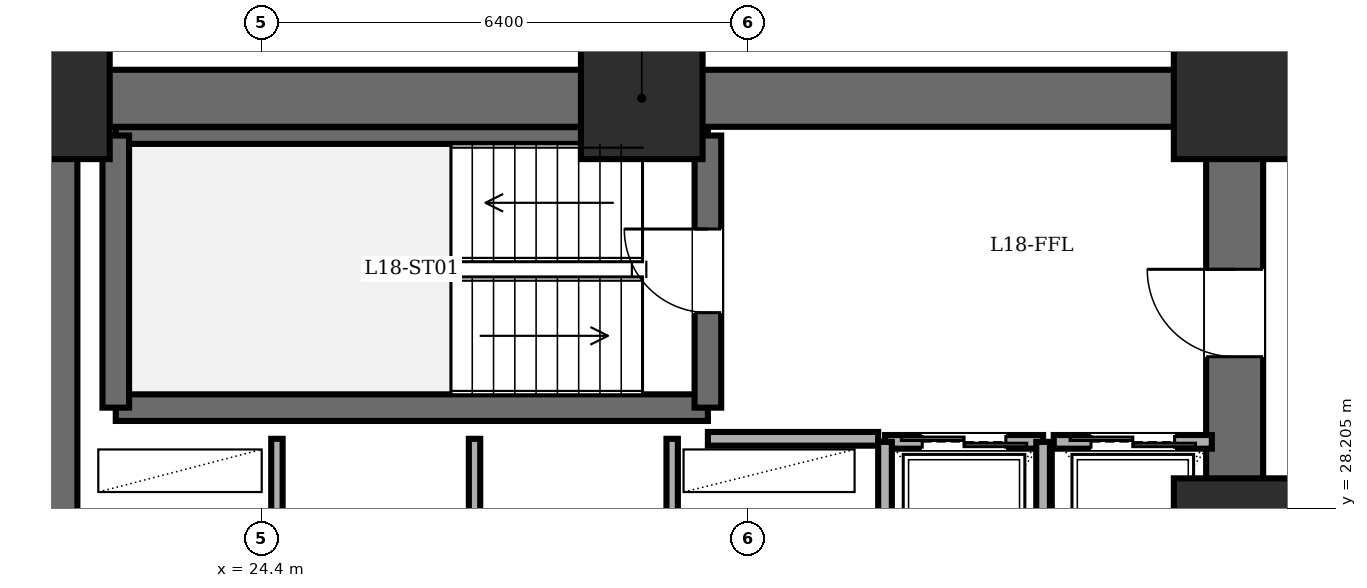
"""IFC4 building model, lengths in metres.
Left out: names, types, materials, properties, quantities, classifications, styles, units other than length and angle.
Written with IfcOpenShell. Run it as: python <this file> out.ifc"""

import sys

from ifc_helpers import new_model, si_unit, direction, frame, frame_2d, origin, origin_2d, place, context, subcontext, project, spatial, rectangle, extrude, element, fill, save


model = new_model("IFC4")
c1 = context("Model", 3, precision=1e-05, world=origin(), true_north=direction((0.0, 1.0)))
c2 = subcontext(c1, "Body", "Model", "MODEL_VIEW")
j1 = project(units=[si_unit("LENGTHUNIT", "METRE"), si_unit("PLANEANGLEUNIT", "RADIAN")], contexts=[c1])
p1 = place(None, origin())
s1 = spatial("IfcSite", under=j1, at=p1, CompositionType="ELEMENT")
p2 = place(p1, origin())
s2 = spatial("IfcBuilding", under=s1, at=p2, CompositionType="ELEMENT")
p3 = place(p2, frame((0.0, 0.0, 68.4)))
s3 = spatial("IfcBuildingStorey", under=s2, at=p3, CompositionType="ELEMENT", Elevation=68.4)
for number, where, z_axis, x_axis in (
    (1, (37.2, 27.8, 0.0), (0.0, 0.0, 1.0), (1.0, 0.0, 0.0)),
    (2, (37.2, 33.6, 0.0), (0.0, 0.0, 1.0), (1.0, 0.0, 0.0)),
    (3, (29.4, 33.6, 0.0), (0.0, 0.0, 1.0), (1.0, 0.0, 0.0)),
    (4, (21.6, 33.6, 0.0), (0.0, 0.0, 1.0), (1.0, 0.0, 0.0)),
):
    element("IfcColumn", number, at=place(p3, frame(where, z_axis=z_axis, x_axis=x_axis)), inside=s3, PredefinedType="COLUMN", context=c2, shape_type="SweptSolid", body=[
        extrude(rectangle(XDim=1.6, YDim=1.6, at=origin_2d()), origin(), (0.0, 0.0, 1.0), 3.6),
    ])
p4 = place(p3, frame((21.6, 14.4, 0.0), z_axis=(0.0, 0.0, 1.0), x_axis=(0.0, 1.0, 0.0)))
e5 = element("IfcWall", 5, at=p4, inside=s3, PredefinedType="SHEAR", context=c2, shape_type="SweptSolid", body=[
    extrude(rectangle(XDim=19.2, YDim=0.75, at=frame_2d((9.6, 0.0))), origin(), (0.0, 0.0, 1.0), 3.4),
])
p5 = place(p3, frame((21.6, 33.6, 0.0), z_axis=(0.0, 0.0, 1.0), x_axis=(1.0, 0.0, 0.0)))
e6 = element("IfcWall", 6, at=p5, inside=s3, PredefinedType="SHEAR", context=c2, shape_type="SweptSolid", body=[
    extrude(rectangle(XDim=15.6, YDim=0.75, at=frame_2d((7.8, 0.0))), origin(), (0.0, 0.0, 1.0), 3.4),
])
p6 = place(p3, frame((37.2, 14.4, 0.0), z_axis=(0.0, 0.0, 1.0), x_axis=(0.0, 1.0, 0.0)))
e7 = element("IfcWall", 7, at=p6, inside=s3, PredefinedType="SHEAR", context=c2, shape_type="SweptSolid", body=[
    extrude(rectangle(XDim=19.2, YDim=0.75, at=frame_2d((9.6, 0.0))), origin(), (0.0, 0.0, 1.0), 3.4),
])
p7 = place(p6, frame((15.8, 0.0, 0.0)))
e8 = element("IfcOpeningElement", 8, at=p7, cuts=e7, PredefinedType="OPENING", context=c2, shape_type="SweptSolid", body=[
    extrude(rectangle(XDim=1.15, YDim=2.15, at=frame_2d((0.575, 1.075))), frame((0.0, 0.385, 0.0), z_axis=(0.0, -1.0, 0.0), x_axis=(1.0, 0.0, 0.0)), (0.0, 0.0, 1.0), 0.77),
])
p8 = place(p6, frame((3.6, 0.0, 0.0)))
e9 = element("IfcOpeningElement", 9, at=p8, cuts=e7, PredefinedType="OPENING", context=c2, shape_type="SweptSolid", body=[
    extrude(rectangle(XDim=1.1, YDim=2.15, at=frame_2d((0.55, 1.075))), frame((0.0, 0.385, 0.0), z_axis=(0.0, -1.0, 0.0), x_axis=(1.0, 0.0, 0.0)), (0.0, 0.0, 1.0), 0.77),
])
p9 = place(p6, frame((8.6, 0.0, 0.0)))
e10 = element("IfcOpeningElement", 10, at=p9, cuts=e7, PredefinedType="OPENING", context=c2, shape_type="SweptSolid", body=[
    extrude(rectangle(XDim=1.3, YDim=2.2, at=frame_2d((0.65, 1.1))), frame((0.0, 0.385, 0.0), z_axis=(0.0, -1.0, 0.0), x_axis=(1.0, 0.0, 0.0)), (0.0, 0.0, 1.0), 0.77),
])
p10 = place(p3, frame((22.48, 29.53, 0.0), z_axis=(0.0, 0.0, 1.0), x_axis=(1.0, 0.0, 0.0)))
e11 = element("IfcWall", 11, at=p10, inside=s3, PredefinedType="SOLIDWALL", context=c2, shape_type="SweptSolid", body=[
    extrude(rectangle(XDim=7.79, YDim=0.35, at=frame_2d((3.895, 0.0))), origin(), (0.0, 0.0, 1.0), 3.4),
])
p11 = place(p3, frame((22.48, 33.11, 0.0), z_axis=(0.0, 0.0, 1.0), x_axis=(1.0, 0.0, 0.0)))
e12 = element("IfcWall", 12, at=p11, inside=s3, PredefinedType="PARTITIONING", context=c2, shape_type="SweptSolid", body=[
    extrude(rectangle(XDim=7.79, YDim=0.22, at=frame_2d((3.895, 0.0))), origin(), (0.0, 0.0, 1.0), 3.4),
])
p12 = place(p3, frame((22.48, 29.53, 0.0), z_axis=(0.0, 0.0, 1.0), x_axis=(0.0, 1.0, 0.0)))
e13 = element("IfcWall", 13, at=p12, inside=s3, PredefinedType="SOLIDWALL", context=c2, shape_type="SweptSolid", body=[
    extrude(rectangle(XDim=3.58, YDim=0.35, at=frame_2d((1.79, 0.0))), origin(), (0.0, 0.0, 1.0), 3.4),
])
p13 = place(p3, frame((30.27, 29.53, 0.0), z_axis=(0.0, 0.0, 1.0), x_axis=(0.0, 1.0, 0.0)))
e14 = element("IfcWall", 14, at=p13, inside=s3, PredefinedType="SOLIDWALL", context=c2, shape_type="SweptSolid", body=[
    extrude(rectangle(XDim=3.58, YDim=0.35, at=frame_2d((1.79, 0.0))), origin(), (0.0, 0.0, 1.0), 3.4),
])
p14 = place(p13, frame((1.25, 0.0, 0.0)))
e15 = element("IfcOpeningElement", 15, at=p14, cuts=e14, PredefinedType="OPENING", context=c2, shape_type="SweptSolid", body=[
    extrude(rectangle(XDim=1.1, YDim=2.15, at=frame_2d((0.55, 1.075))), frame((0.0, 0.185, 0.0), z_axis=(0.0, -1.0, 0.0), x_axis=(1.0, 0.0, 0.0)), (0.0, 0.0, 1.0), 0.37),
])
p15 = place(p3, frame((30.27, 29.12, 0.0), z_axis=(0.0, 0.0, 1.0), x_axis=(1.0, 0.0, 0.0)))
e16 = element("IfcWall", 16, at=p15, inside=s3, PredefinedType="PARTITIONING", context=c2, shape_type="SweptSolid", body=[
    extrude(rectangle(XDim=2.24, YDim=0.18, at=frame_2d((1.12, 0.0))), origin(), (0.0, 0.0, 1.0), 3.4),
])
for number, where, z_axis, x_axis in (
    (17, (24.6, 27.6, 0.0), (0.0, 0.0, 1.0), (0.0, 1.0, 0.0)),
    (18, (27.2, 27.6, 0.0), (0.0, 0.0, 1.0), (0.0, 1.0, 0.0)),
    (19, (29.8, 27.6, 0.0), (0.0, 0.0, 1.0), (0.0, 1.0, 0.0)),
):
    element("IfcWall", number, at=place(p3, frame(where, z_axis=z_axis, x_axis=x_axis)), inside=s3, PredefinedType="PARTITIONING", context=c2, shape_type="SweptSolid", body=[
        extrude(rectangle(XDim=1.52, YDim=0.15, at=frame_2d((0.76, 0.0))), origin(), (0.0, 0.0, 1.0), 3.4),
    ])
p16 = place(p3, frame((32.6, 29.08, 0.0), z_axis=(0.0, 0.0, 1.0), x_axis=(1.0, 0.0, 0.0)))
e20 = element("IfcWall", 20, at=p16, inside=s3, PredefinedType="PARTITIONING", context=c2, shape_type="SweptSolid", body=[
    extrude(rectangle(XDim=2.08, YDim=0.18, at=frame_2d((1.04, 0.0))), origin(), (0.0, 0.0, 1.0), 3.4),
])
p17 = place(p16, frame((0.49, 0.0, 0.0)))
e21 = element("IfcOpeningElement", 21, at=p17, cuts=e20, PredefinedType="OPENING", context=c2, shape_type="SweptSolid", body=[
    extrude(rectangle(XDim=1.1, YDim=2.2, at=frame_2d((0.55, 1.1))), frame((0.0, 0.1, 0.0), z_axis=(0.0, -1.0, 0.0), x_axis=(1.0, 0.0, 0.0)), (0.0, 0.0, 1.0), 0.2),
])
for number, where, z_axis, x_axis in (
    (22, (34.68, 26.35, 0.0), (0.0, 0.0, 1.0), (0.0, 1.0, 0.0)),
    (23, (32.6, 29.08, 0.0), (0.0, 0.0, 1.0), (0.0, -1.0, 0.0)),
):
    element("IfcWall", number, at=place(p3, frame(where, z_axis=z_axis, x_axis=x_axis)), inside=s3, PredefinedType="PARTITIONING", context=c2, shape_type="SweptSolid", body=[
        extrude(rectangle(XDim=2.73, YDim=0.18, at=frame_2d((1.365, 0.0))), origin(), (0.0, 0.0, 1.0), 3.4),
    ])
p18 = place(p3, frame((34.82, 29.08, 0.0), z_axis=(0.0, 0.0, 1.0), x_axis=(1.0, 0.0, 0.0)))
e24 = element("IfcWall", 24, at=p18, inside=s3, PredefinedType="PARTITIONING", context=c2, shape_type="SweptSolid", body=[
    extrude(rectangle(XDim=2.08, YDim=0.18, at=frame_2d((1.04, 0.0))), origin(), (0.0, 0.0, 1.0), 3.4),
])
p19 = place(p18, frame((0.49, 0.0, 0.0)))
e25 = element("IfcOpeningElement", 25, at=p19, cuts=e24, PredefinedType="OPENING", context=c2, shape_type="SweptSolid", body=[
    extrude(rectangle(XDim=1.1, YDim=2.2, at=frame_2d((0.55, 1.1))), frame((0.0, 0.1, 0.0), z_axis=(0.0, -1.0, 0.0), x_axis=(1.0, 0.0, 0.0)), (0.0, 0.0, 1.0), 0.2),
])
p20 = place(p14, origin())
e26 = element("IfcDoor", 26, at=p20, inside=s3, OperationType="SINGLE_SWING_RIGHT", PredefinedType="DOOR", context=c2, shape_type="SweptSolid", body=[
    extrude(rectangle(XDim=1.1, YDim=2.15, at=frame_2d((0.55, 1.075))), frame((0.0, 0.025, 0.0), z_axis=(0.0, -1.0, 0.0), x_axis=(1.0, 0.0, 0.0)), (0.0, 0.0, 1.0), 0.05),
])
fill(e15, e26)
p21 = place(p7, origin())
e27 = element("IfcDoor", 27, at=p21, inside=s3, OperationType="SINGLE_SWING_RIGHT", PredefinedType="DOOR", context=c2, shape_type="SweptSolid", body=[
    extrude(rectangle(XDim=1.15, YDim=2.15, at=frame_2d((0.575, 1.075))), frame((0.0, 0.025, 0.0), z_axis=(0.0, -1.0, 0.0), x_axis=(1.0, 0.0, 0.0)), (0.0, 0.0, 1.0), 0.05),
])
fill(e8, e27)
p22 = place(p17, origin())
e28 = element("IfcDoor", 28, at=p22, inside=s3, OperationType="DOUBLE_DOOR_SLIDING", PredefinedType="DOOR", context=c2, shape_type="SweptSolid", body=[
    extrude(rectangle(XDim=1.1, YDim=2.2, at=frame_2d((0.55, 1.1))), frame((0.0, 0.025, 0.0), z_axis=(0.0, -1.0, 0.0), x_axis=(1.0, 0.0, 0.0)), (0.0, 0.0, 1.0), 0.05),
])
fill(e21, e28)
p23 = place(p19, origin())
e29 = element("IfcDoor", 29, at=p23, inside=s3, OperationType="DOUBLE_DOOR_SLIDING", PredefinedType="DOOR", context=c2, shape_type="SweptSolid", body=[
    extrude(rectangle(XDim=1.1, YDim=2.2, at=frame_2d((0.55, 1.1))), frame((0.0, 0.025, 0.0), z_axis=(0.0, -1.0, 0.0), x_axis=(1.0, 0.0, 0.0)), (0.0, 0.0, 1.0), 0.05),
])
fill(e25, e29)
save(model, sys.argv[1])
